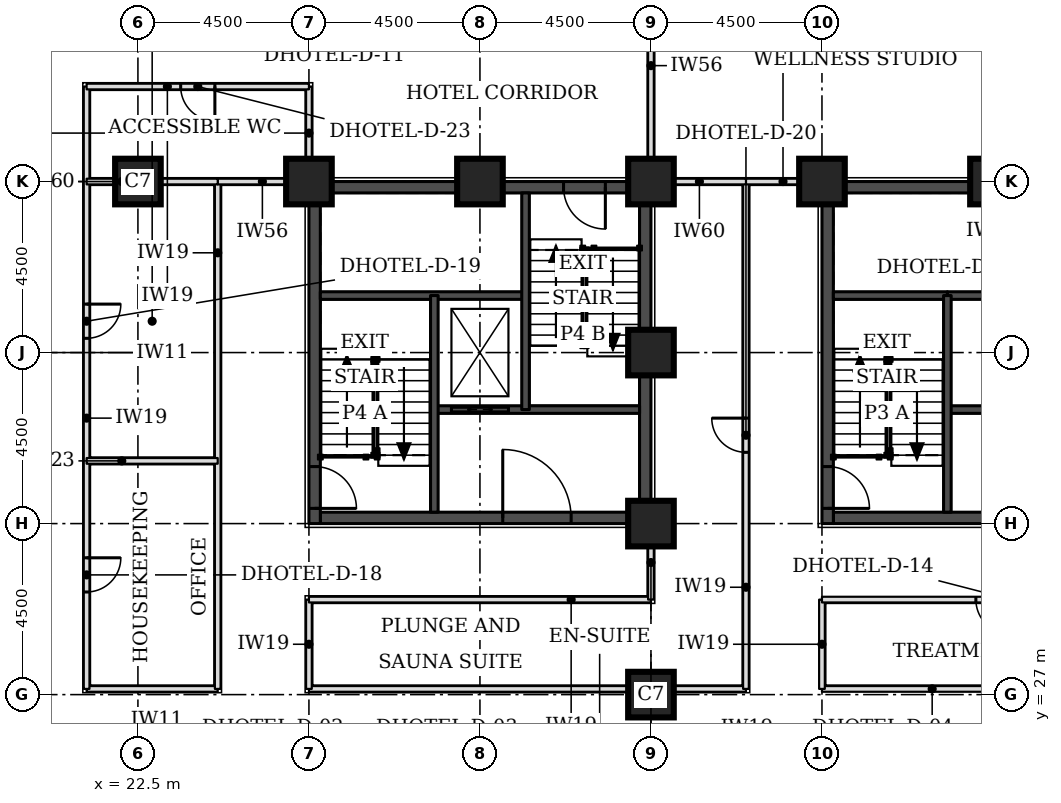
"""IFC4 building model, lengths in metres.
Left out: names, types, materials, properties, quantities, classifications, styles, units other than length and angle.
Written with IfcOpenShell. Run it as: python <this file> out.ifc"""

import sys

from ifc_helpers import new_model, si_unit, direction, frame, frame_2d, origin, origin_2d, place, context, subcontext, project, spatial, rectangle, extrude, element, fill, save


model = new_model("IFC4")
c1 = context("Model", 3, precision=1e-05, world=origin(), true_north=direction((0.0, 1.0)))
c2 = subcontext(c1, "Body", "Model", "MODEL_VIEW")
j1 = project(units=[si_unit("LENGTHUNIT", "METRE"), si_unit("PLANEANGLEUNIT", "RADIAN")], contexts=[c1])
p1 = place(None, origin())
s1 = spatial("IfcSite", under=j1, at=p1, CompositionType="ELEMENT")
p2 = place(p1, origin())
s2 = spatial("IfcBuilding", under=s1, at=p2, CompositionType="ELEMENT")
p3 = place(p2, frame((0.0, 0.0, 36.3)))
s3 = spatial("IfcBuildingStorey", under=s2, at=p3, CompositionType="ELEMENT", Elevation=36.3)
for number, where, z_axis, x_axis in (
    (1, (36.0, 27.0, 0.0), (0.0, 0.0, 1.0), (1.0, 0.0, 0.0)),
    (2, (36.0, 31.5, 0.0), (0.0, 0.0, 1.0), (1.0, 0.0, 0.0)),
    (3, (36.0, 36.0, 0.0), (0.0, 0.0, 1.0), (1.0, 0.0, 0.0)),
    (4, (22.5, 40.5, 0.0), (0.0, 0.0, 1.0), (1.0, 0.0, 0.0)),
    (5, (27.0, 40.5, 0.0), (0.0, 0.0, 1.0), (1.0, 0.0, 0.0)),
    (6, (31.5, 40.5, 0.0), (0.0, 0.0, 1.0), (1.0, 0.0, 0.0)),
    (7, (36.0, 40.5, 0.0), (0.0, 0.0, 1.0), (1.0, 0.0, 0.0)),
    (8, (40.5, 40.5, 0.0), (0.0, 0.0, 1.0), (1.0, 0.0, 0.0)),
    (9, (45.0, 40.5, 0.0), (0.0, 0.0, 1.0), (1.0, 0.0, 0.0)),
):
    element("IfcColumn", number, at=place(p3, frame(where, z_axis=z_axis, x_axis=x_axis)), inside=s3, PredefinedType="COLUMN", context=c2, shape_type="SweptSolid", body=[
        extrude(rectangle(XDim=1.2, YDim=1.2, at=origin_2d()), origin(), (0.0, 0.0, 1.0), 3.3),
    ])
p4 = place(p3, frame((40.8, 31.65, 0.0), z_axis=(0.0, 0.0, 1.0), x_axis=(1.0, 0.0, 0.0)))
e10 = element("IfcWall", 10, at=p4, inside=s3, PredefinedType="SHEAR", context=c2, shape_type="SweptSolid", body=[
    extrude(rectangle(XDim=8.4, YDim=0.3, at=frame_2d((4.2, 0.0))), origin(), (0.0, 0.0, 1.0), 3.3),
])
p5 = place(p4, frame((5.2, 0.0, 0.0)))
e11 = element("IfcOpeningElement", 11, at=p5, cuts=e10, PredefinedType="OPENING", context=c2, shape_type="SweptSolid", body=[
    extrude(rectangle(XDim=1.0, YDim=2.1, at=frame_2d((0.5, 1.05))), frame((0.0, 0.16, 0.0), z_axis=(0.0, -1.0, 0.0), x_axis=(1.0, 0.0, 0.0)), (0.0, 0.0, 1.0), 0.32),
])
p6 = place(p3, frame((40.8, 40.35, 0.0), z_axis=(0.0, 0.0, 1.0), x_axis=(1.0, 0.0, 0.0)))
e12 = element("IfcWall", 12, at=p6, inside=s3, PredefinedType="SHEAR", context=c2, shape_type="SweptSolid", body=[
    extrude(rectangle(XDim=8.4, YDim=0.3, at=frame_2d((4.2, 0.0))), origin(), (0.0, 0.0, 1.0), 3.3),
])
p7 = place(p6, frame((6.4, 0.0, 0.0)))
e13 = element("IfcOpeningElement", 13, at=p7, cuts=e12, PredefinedType="OPENING", context=c2, shape_type="SweptSolid", body=[
    extrude(rectangle(XDim=1.1, YDim=2.1, at=frame_2d((0.55, 1.05))), frame((0.0, 0.16, 0.0), z_axis=(0.0, -1.0, 0.0), x_axis=(1.0, 0.0, 0.0)), (0.0, 0.0, 1.0), 0.32),
])
p8 = place(p3, frame((40.65, 31.5, 0.0), z_axis=(0.0, 0.0, 1.0), x_axis=(0.0, 1.0, 0.0)))
e14 = element("IfcWall", 14, at=p8, inside=s3, PredefinedType="SHEAR", context=c2, shape_type="SweptSolid", body=[
    extrude(rectangle(XDim=9.0, YDim=0.3, at=frame_2d((4.5, 0.0))), origin(), (0.0, 0.0, 1.0), 3.3),
])
p9 = place(p8, frame((0.4, 0.0, 0.0)))
e15 = element("IfcOpeningElement", 15, at=p9, cuts=e14, PredefinedType="OPENING", context=c2, shape_type="SweptSolid", body=[
    extrude(rectangle(XDim=1.1, YDim=2.1, at=frame_2d((0.55, 1.05))), frame((0.0, 0.16, 0.0), z_axis=(0.0, -1.0, 0.0), x_axis=(1.0, 0.0, 0.0)), (0.0, 0.0, 1.0), 0.32),
])
p10 = place(p3, frame((27.3, 31.65, 0.0), z_axis=(0.0, 0.0, 1.0), x_axis=(1.0, 0.0, 0.0)))
e16 = element("IfcWall", 16, at=p10, inside=s3, PredefinedType="SHEAR", context=c2, shape_type="SweptSolid", body=[
    extrude(rectangle(XDim=8.4, YDim=0.3, at=frame_2d((4.2, 0.0))), origin(), (0.0, 0.0, 1.0), 3.3),
])
p11 = place(p10, frame((4.8, 0.0, 0.0)))
e17 = element("IfcOpeningElement", 17, at=p11, cuts=e16, PredefinedType="OPENING", context=c2, shape_type="SweptSolid", body=[
    extrude(rectangle(XDim=1.8, YDim=2.1, at=frame_2d((0.9, 1.05))), frame((0.0, 0.16, 0.0), z_axis=(0.0, -1.0, 0.0), x_axis=(1.0, 0.0, 0.0)), (0.0, 0.0, 1.0), 0.32),
])
p12 = place(p3, frame((27.3, 40.35, 0.0), z_axis=(0.0, 0.0, 1.0), x_axis=(1.0, 0.0, 0.0)))
e18 = element("IfcWall", 18, at=p12, inside=s3, PredefinedType="SHEAR", context=c2, shape_type="SweptSolid", body=[
    extrude(rectangle(XDim=8.4, YDim=0.3, at=frame_2d((4.2, 0.0))), origin(), (0.0, 0.0, 1.0), 3.3),
])
p13 = place(p12, frame((6.4, 0.0, 0.0)))
e19 = element("IfcOpeningElement", 19, at=p13, cuts=e18, PredefinedType="OPENING", context=c2, shape_type="SweptSolid", body=[
    extrude(rectangle(XDim=1.1, YDim=2.1, at=frame_2d((0.55, 1.05))), frame((0.0, 0.16, 0.0), z_axis=(0.0, -1.0, 0.0), x_axis=(1.0, 0.0, 0.0)), (0.0, 0.0, 1.0), 0.32),
])
p14 = place(p3, frame((27.15, 31.5, 0.0), z_axis=(0.0, 0.0, 1.0), x_axis=(0.0, 1.0, 0.0)))
e20 = element("IfcWall", 20, at=p14, inside=s3, PredefinedType="SHEAR", context=c2, shape_type="SweptSolid", body=[
    extrude(rectangle(XDim=9.0, YDim=0.3, at=frame_2d((4.5, 0.0))), origin(), (0.0, 0.0, 1.0), 3.3),
])
p15 = place(p14, frame((0.4, 0.0, 0.0)))
e21 = element("IfcOpeningElement", 21, at=p15, cuts=e20, PredefinedType="OPENING", context=c2, shape_type="SweptSolid", body=[
    extrude(rectangle(XDim=1.1, YDim=2.1, at=frame_2d((0.55, 1.05))), frame((0.0, 0.16, 0.0), z_axis=(0.0, -1.0, 0.0), x_axis=(1.0, 0.0, 0.0)), (0.0, 0.0, 1.0), 0.32),
])
p16 = place(p3, frame((35.85, 31.5, 0.0), z_axis=(0.0, 0.0, 1.0), x_axis=(0.0, 1.0, 0.0)))
e22 = element("IfcWall", 22, at=p16, inside=s3, PredefinedType="SHEAR", context=c2, shape_type="SweptSolid", body=[
    extrude(rectangle(XDim=9.0, YDim=0.3, at=frame_2d((4.5, 0.0))), origin(), (0.0, 0.0, 1.0), 3.3),
])
p17 = place(p3, frame((21.15, 27.15, 0.0), z_axis=(0.0, 0.0, 1.0), x_axis=(1.0, 0.0, 0.0)))
e23 = element("IfcWall", 23, at=p17, inside=s3, PredefinedType="PARTITIONING", context=c2, shape_type="SweptSolid", body=[
    extrude(rectangle(XDim=3.45, YDim=0.15, at=frame_2d((1.725, 0.0))), origin(), (0.0, 0.0, 1.0), 3.08),
])
p18 = place(p3, frame((21.15, 27.15, 0.0), z_axis=(0.0, 0.0, 1.0), x_axis=(0.0, 1.0, 0.0)))
e24 = element("IfcWall", 24, at=p18, inside=s3, PredefinedType="PARTITIONING", context=c2, shape_type="SweptSolid", body=[
    extrude(rectangle(XDim=15.85, YDim=0.15, at=frame_2d((7.925, 0.0))), origin(), (0.0, 0.0, 1.0), 3.08),
])
p19 = place(p18, frame((2.55, 0.0, 0.0)))
e25 = element("IfcOpeningElement", 25, at=p19, cuts=e24, PredefinedType="OPENING", context=c2, shape_type="SweptSolid", body=[
    extrude(rectangle(XDim=0.9, YDim=2.1, at=frame_2d((0.45, 1.05))), frame((0.0, 0.085, 0.0), z_axis=(0.0, -1.0, 0.0), x_axis=(1.0, 0.0, 0.0)), (0.0, 0.0, 1.0), 0.17),
])
p20 = place(p18, frame((9.225, 0.0, 0.0)))
e26 = element("IfcOpeningElement", 26, at=p20, cuts=e24, PredefinedType="OPENING", context=c2, shape_type="SweptSolid", body=[
    extrude(rectangle(XDim=0.9, YDim=2.1, at=frame_2d((0.45, 1.05))), frame((0.0, 0.085, 0.0), z_axis=(0.0, -1.0, 0.0), x_axis=(1.0, 0.0, 0.0)), (0.0, 0.0, 1.0), 0.17),
])
p21 = place(p3, frame((24.6, 27.15, 0.0), z_axis=(0.0, 0.0, 1.0), x_axis=(0.0, 1.0, 0.0)))
e27 = element("IfcWall", 27, at=p21, inside=s3, PredefinedType="PARTITIONING", context=c2, shape_type="SweptSolid", body=[
    extrude(rectangle(XDim=13.35, YDim=0.15, at=frame_2d((6.675, 0.0))), origin(), (0.0, 0.0, 1.0), 3.08),
])
p22 = place(p3, frame((27.0, 27.15, 0.0), z_axis=(0.0, 0.0, 1.0), x_axis=(1.0, 0.0, 0.0)))
e28 = element("IfcWall", 28, at=p22, inside=s3, PredefinedType="PARTITIONING", context=c2, shape_type="SweptSolid", body=[
    extrude(rectangle(XDim=11.5, YDim=0.15, at=frame_2d((5.75, 0.0))), origin(), (0.0, 0.0, 1.0), 3.08),
])
p23 = place(p3, frame((27.0, 27.15, 0.0), z_axis=(0.0, 0.0, 1.0), x_axis=(0.0, 1.0, 0.0)))
e29 = element("IfcWall", 29, at=p23, inside=s3, PredefinedType="PARTITIONING", context=c2, shape_type="SweptSolid", body=[
    extrude(rectangle(XDim=2.35, YDim=0.15, at=frame_2d((1.175, 0.0))), origin(), (0.0, 0.0, 1.0), 3.08),
])
p24 = place(p3, frame((38.5, 27.15, 0.0), z_axis=(0.0, 0.0, 1.0), x_axis=(0.0, 1.0, 0.0)))
e30 = element("IfcWall", 30, at=p24, inside=s3, PredefinedType="PARTITIONING", context=c2, shape_type="SweptSolid", body=[
    extrude(rectangle(XDim=13.35, YDim=0.15, at=frame_2d((6.675, 0.0))), origin(), (0.0, 0.0, 1.0), 3.08),
])
p25 = place(p24, frame((6.225, 0.0, 0.0)))
e31 = element("IfcOpeningElement", 31, at=p25, cuts=e30, PredefinedType="OPENING", context=c2, shape_type="SweptSolid", body=[
    extrude(rectangle(XDim=0.9, YDim=2.1, at=frame_2d((0.45, 1.05))), frame((0.0, 0.085, 0.0), z_axis=(0.0, -1.0, 0.0), x_axis=(1.0, 0.0, 0.0)), (0.0, 0.0, 1.0), 0.17),
])
p26 = place(p3, frame((40.5, 27.15, 0.0), z_axis=(0.0, 0.0, 1.0), x_axis=(1.0, 0.0, 0.0)))
e32 = element("IfcWall", 32, at=p26, inside=s3, PredefinedType="PARTITIONING", context=c2, shape_type="SweptSolid", body=[
    extrude(rectangle(XDim=9.0, YDim=0.15, at=frame_2d((4.5, 0.0))), origin(), (0.0, 0.0, 1.0), 3.08),
])
p27 = place(p3, frame((40.5, 27.15, 0.0), z_axis=(0.0, 0.0, 1.0), x_axis=(0.0, 1.0, 0.0)))
e33 = element("IfcWall", 33, at=p27, inside=s3, PredefinedType="PARTITIONING", context=c2, shape_type="SweptSolid", body=[
    extrude(rectangle(XDim=2.35, YDim=0.15, at=frame_2d((1.175, 0.0))), origin(), (0.0, 0.0, 1.0), 3.08),
])
p28 = place(p3, frame((27.0, 29.5, 0.0), z_axis=(0.0, 0.0, 1.0), x_axis=(1.0, 0.0, 0.0)))
e34 = element("IfcWall", 34, at=p28, inside=s3, PredefinedType="PARTITIONING", context=c2, shape_type="SweptSolid", body=[
    extrude(rectangle(XDim=9.0, YDim=0.15, at=frame_2d((4.5, 0.0))), origin(), (0.0, 0.0, 1.0), 3.08),
])
p29 = place(p3, frame((36.0, 29.5, 0.0), z_axis=(0.0, 0.0, 1.0), x_axis=(0.0, 1.0, 0.0)))
e35 = element("IfcWall", 35, at=p29, inside=s3, PredefinedType="PARTITIONING", context=c2, shape_type="SweptSolid", body=[
    extrude(rectangle(XDim=1.95, YDim=0.15, at=frame_2d((0.975, 0.0))), origin(), (0.0, 0.0, 1.0), 2.33),
])
p30 = place(p3, frame((40.5, 29.5, 0.0), z_axis=(0.0, 0.0, 1.0), x_axis=(1.0, 0.0, 0.0)))
e36 = element("IfcWall", 36, at=p30, inside=s3, PredefinedType="PARTITIONING", context=c2, shape_type="SweptSolid", body=[
    extrude(rectangle(XDim=9.0, YDim=0.15, at=frame_2d((4.5, 0.0))), origin(), (0.0, 0.0, 1.0), 3.08),
])
p31 = place(p30, frame((4.05, 0.0, 0.0)))
e37 = element("IfcOpeningElement", 37, at=p31, cuts=e36, PredefinedType="OPENING", context=c2, shape_type="SweptSolid", body=[
    extrude(rectangle(XDim=0.9, YDim=2.1, at=frame_2d((0.45, 1.05))), frame((0.0, 0.085, 0.0), z_axis=(0.0, -1.0, 0.0), x_axis=(1.0, 0.0, 0.0)), (0.0, 0.0, 1.0), 0.17),
])
p32 = place(p3, frame((24.6, 40.5, 0.0), z_axis=(0.0, 0.0, 1.0), x_axis=(1.0, 0.0, 0.0)))
e38 = element("IfcWall", 38, at=p32, inside=s3, PredefinedType="PARTITIONING", context=c2, shape_type="SweptSolid", body=[
    extrude(rectangle(XDim=2.35, YDim=0.15, at=frame_2d((1.175, 0.0))), origin(), (0.0, 0.0, 1.0), 2.33),
])
p33 = place(p3, frame((38.5, 40.5, 0.0), z_axis=(0.0, 0.0, 1.0), x_axis=(1.0, 0.0, 0.0)))
e39 = element("IfcWall", 39, at=p33, inside=s3, PredefinedType="PARTITIONING", context=c2, shape_type="SweptSolid", body=[
    extrude(rectangle(XDim=1.95, YDim=0.15, at=frame_2d((0.975, 0.0))), origin(), (0.0, 0.0, 1.0), 2.33),
])
p34 = place(p3, frame((27.0, 40.55, 0.0), z_axis=(0.0, 0.0, 1.0), x_axis=(0.0, 1.0, 0.0)))
e40 = element("IfcWall", 40, at=p34, inside=s3, PredefinedType="PARTITIONING", context=c2, shape_type="SweptSolid", body=[
    extrude(rectangle(XDim=2.45, YDim=0.15, at=frame_2d((1.225, 0.0))), origin(), (0.0, 0.0, 1.0), 3.08),
])
p35 = place(p3, frame((36.0, 40.55, 0.0), z_axis=(0.0, 0.0, 1.0), x_axis=(0.0, 1.0, 0.0)))
e41 = element("IfcWall", 41, at=p35, inside=s3, PredefinedType="PARTITIONING", context=c2, shape_type="SweptSolid", body=[
    extrude(rectangle(XDim=4.4, YDim=0.15, at=frame_2d((2.2, 0.0))), origin(), (0.0, 0.0, 1.0), 2.33),
])
p36 = place(p3, frame((21.15, 43.0, 0.0), z_axis=(0.0, 0.0, 1.0), x_axis=(1.0, 0.0, 0.0)))
e42 = element("IfcWall", 42, at=p36, inside=s3, PredefinedType="PARTITIONING", context=c2, shape_type="SweptSolid", body=[
    extrude(rectangle(XDim=5.85, YDim=0.15, at=frame_2d((2.925, 0.0))), origin(), (0.0, 0.0, 1.0), 3.08),
])
p37 = place(p36, frame((2.475, 0.0, 0.0)))
e43 = element("IfcOpeningElement", 43, at=p37, cuts=e42, PredefinedType="OPENING", context=c2, shape_type="SweptSolid", body=[
    extrude(rectangle(XDim=0.9, YDim=2.1, at=frame_2d((0.45, 1.05))), frame((0.0, 0.085, 0.0), z_axis=(0.0, -1.0, 0.0), x_axis=(1.0, 0.0, 0.0)), (0.0, 0.0, 1.0), 0.17),
])
p38 = place(p3, frame((21.15, 33.15, 0.0), z_axis=(0.0, 0.0, 1.0), x_axis=(1.0, 0.0, 0.0)))
e44 = element("IfcWall", 44, at=p38, inside=s3, PredefinedType="PARTITIONING", context=c2, shape_type="SweptSolid", body=[
    extrude(rectangle(XDim=3.45, YDim=0.15, at=frame_2d((1.725, 0.0))), origin(), (0.0, 0.0, 1.0), 3.08),
])
p39 = place(p3, frame((21.15, 40.5, 0.0), z_axis=(0.0, 0.0, 1.0), x_axis=(1.0, 0.0, 0.0)))
e45 = element("IfcWall", 45, at=p39, inside=s3, PredefinedType="PARTITIONING", context=c2, shape_type="SweptSolid", body=[
    extrude(rectangle(XDim=3.45, YDim=0.15, at=frame_2d((1.725, 0.0))), origin(), (0.0, 0.0, 1.0), 2.33),
])
p40 = place(p3, frame((36.05, 40.5, 0.0), z_axis=(0.0, 0.0, 1.0), x_axis=(1.0, 0.0, 0.0)))
e46 = element("IfcWall", 46, at=p40, inside=s3, PredefinedType="PARTITIONING", context=c2, shape_type="SweptSolid", body=[
    extrude(rectangle(XDim=2.45, YDim=0.15, at=frame_2d((1.225, 0.0))), origin(), (0.0, 0.0, 1.0), 2.33),
])
p41 = place(p3, frame((43.8, 34.5, 0.0), z_axis=(0.0, 0.0, 1.0), x_axis=(1.0, 0.0, 0.0)))
e47 = element("IfcWall", 47, at=p41, inside=s3, PredefinedType="SOLIDWALL", context=c2, shape_type="SweptSolid", body=[
    extrude(rectangle(XDim=2.4, YDim=0.2, at=frame_2d((1.2, 0.0))), origin(), (0.0, 0.0, 1.0), 3.08),
])
p42 = place(p3, frame((43.8, 37.5, 0.0), z_axis=(0.0, 0.0, 1.0), x_axis=(1.0, 0.0, 0.0)))
e48 = element("IfcWall", 48, at=p42, inside=s3, PredefinedType="SOLIDWALL", context=c2, shape_type="SweptSolid", body=[
    extrude(rectangle(XDim=2.4, YDim=0.2, at=frame_2d((1.2, 0.0))), origin(), (0.0, 0.0, 1.0), 3.3),
])
p43 = place(p3, frame((40.8, 37.5, 0.0), z_axis=(0.0, 0.0, 1.0), x_axis=(1.0, 0.0, 0.0)))
e49 = element("IfcWall", 49, at=p43, inside=s3, PredefinedType="SOLIDWALL", context=c2, shape_type="SweptSolid", body=[
    extrude(rectangle(XDim=3.0, YDim=0.2, at=frame_2d((1.5, 0.0))), origin(), (0.0, 0.0, 1.0), 3.08),
])
p44 = place(p3, frame((43.8, 31.8, 0.0), z_axis=(0.0, 0.0, 1.0), x_axis=(0.0, 1.0, 0.0)))
e50 = element("IfcWall", 50, at=p44, inside=s3, PredefinedType="SOLIDWALL", context=c2, shape_type="SweptSolid", body=[
    extrude(rectangle(XDim=5.7, YDim=0.2, at=frame_2d((2.85, 0.0))), origin(), (0.0, 0.0, 1.0), 3.08),
])
p45 = place(p3, frame((30.3, 34.5, 0.0), z_axis=(0.0, 0.0, 1.0), x_axis=(1.0, 0.0, 0.0)))
e51 = element("IfcWall", 51, at=p45, inside=s3, PredefinedType="SOLIDWALL", context=c2, shape_type="SweptSolid", body=[
    extrude(rectangle(XDim=5.4, YDim=0.2, at=frame_2d((2.7, 0.0))), origin(), (0.0, 0.0, 1.0), 3.08),
])
p46 = place(p45, frame((0.45, 0.0, 0.0)))
e52 = element("IfcOpeningElement", 52, at=p46, cuts=e51, PredefinedType="OPENING", context=c2, shape_type="SweptSolid", body=[
    extrude(rectangle(XDim=1.5, YDim=2.1, at=frame_2d((0.75, 1.05))), frame((0.0, 0.11, 0.0), z_axis=(0.0, -1.0, 0.0), x_axis=(1.0, 0.0, 0.0)), (0.0, 0.0, 1.0), 0.22),
])
p47 = place(p3, frame((27.3, 37.5, 0.0), z_axis=(0.0, 0.0, 1.0), x_axis=(1.0, 0.0, 0.0)))
e53 = element("IfcWall", 53, at=p47, inside=s3, PredefinedType="SOLIDWALL", context=c2, shape_type="SweptSolid", body=[
    extrude(rectangle(XDim=5.4, YDim=0.2, at=frame_2d((2.7, 0.0))), origin(), (0.0, 0.0, 1.0), 3.08),
])
for number, where, z_axis, x_axis in (
    (54, (30.3, 31.8, 0.0), (0.0, 0.0, 1.0), (0.0, 1.0, 0.0)),
    (55, (32.7, 34.5, 0.0), (0.0, 0.0, 1.0), (0.0, 1.0, 0.0)),
):
    element("IfcWall", number, at=place(p3, frame(where, z_axis=z_axis, x_axis=x_axis)), inside=s3, PredefinedType="SOLIDWALL", context=c2, shape_type="SweptSolid", body=[
        extrude(rectangle(XDim=5.7, YDim=0.2, at=frame_2d((2.85, 0.0))), origin(), (0.0, 0.0, 1.0), 3.08),
    ])
p48 = place(p19, frame((0.9, 0.0, 0.0), z_axis=(0.0, 0.0, 1.0), x_axis=(-1.0, 0.0, 0.0)))
e56 = element("IfcDoor", 56, at=p48, inside=s3, OperationType="SINGLE_SWING_LEFT", PredefinedType="DOOR", context=c2, shape_type="SweptSolid", body=[
    extrude(rectangle(XDim=0.9, YDim=2.1, at=frame_2d((0.45, 1.05))), frame((0.0, 0.025, 0.0), z_axis=(0.0, -1.0, 0.0), x_axis=(1.0, 0.0, 0.0)), (0.0, 0.0, 1.0), 0.05),
])
fill(e25, e56)
p49 = place(p20, frame((0.9, 0.0, 0.0), z_axis=(0.0, 0.0, 1.0), x_axis=(-1.0, 0.0, 0.0)))
e57 = element("IfcDoor", 57, at=p49, inside=s3, OperationType="SINGLE_SWING_LEFT", PredefinedType="DOOR", context=c2, shape_type="SweptSolid", body=[
    extrude(rectangle(XDim=0.9, YDim=2.1, at=frame_2d((0.45, 1.05))), frame((0.0, 0.025, 0.0), z_axis=(0.0, -1.0, 0.0), x_axis=(1.0, 0.0, 0.0)), (0.0, 0.0, 1.0), 0.05),
])
fill(e26, e57)
p50 = place(p25, origin())
e58 = element("IfcDoor", 58, at=p50, inside=s3, OperationType="SINGLE_SWING_RIGHT", PredefinedType="DOOR", context=c2, shape_type="SweptSolid", body=[
    extrude(rectangle(XDim=0.9, YDim=2.1, at=frame_2d((0.45, 1.05))), frame((0.0, 0.025, 0.0), z_axis=(0.0, -1.0, 0.0), x_axis=(1.0, 0.0, 0.0)), (0.0, 0.0, 1.0), 0.05),
])
fill(e31, e58)
p51 = place(p31, frame((0.9, 0.0, 0.0), z_axis=(0.0, 0.0, 1.0), x_axis=(-1.0, 0.0, 0.0)))
e59 = element("IfcDoor", 59, at=p51, inside=s3, OperationType="SINGLE_SWING_LEFT", PredefinedType="DOOR", context=c2, shape_type="SweptSolid", body=[
    extrude(rectangle(XDim=0.9, YDim=2.1, at=frame_2d((0.45, 1.05))), frame((0.0, 0.025, 0.0), z_axis=(0.0, -1.0, 0.0), x_axis=(1.0, 0.0, 0.0)), (0.0, 0.0, 1.0), 0.05),
])
fill(e37, e59)
p52 = place(p37, frame((0.9, 0.0, 0.0), z_axis=(0.0, 0.0, 1.0), x_axis=(-1.0, 0.0, 0.0)))
e60 = element("IfcDoor", 60, at=p52, inside=s3, OperationType="SINGLE_SWING_LEFT", PredefinedType="DOOR", context=c2, shape_type="SweptSolid", body=[
    extrude(rectangle(XDim=0.9, YDim=2.1, at=frame_2d((0.45, 1.05))), frame((0.0, 0.025, 0.0), z_axis=(0.0, -1.0, 0.0), x_axis=(1.0, 0.0, 0.0)), (0.0, 0.0, 1.0), 0.05),
])
fill(e43, e60)
p53 = place(p9, frame((1.1, 0.0, 0.0), z_axis=(0.0, 0.0, 1.0), x_axis=(-1.0, 0.0, 0.0)))
e61 = element("IfcDoor", 61, at=p53, inside=s3, OperationType="SINGLE_SWING_RIGHT", PredefinedType="DOOR", context=c2, shape_type="SweptSolid", body=[
    extrude(rectangle(XDim=1.1, YDim=2.1, at=frame_2d((0.55, 1.05))), frame((0.0, 0.025, 0.0), z_axis=(0.0, -1.0, 0.0), x_axis=(1.0, 0.0, 0.0)), (0.0, 0.0, 1.0), 0.05),
])
fill(e15, e61)
p54 = place(p15, frame((1.1, 0.0, 0.0), z_axis=(0.0, 0.0, 1.0), x_axis=(-1.0, 0.0, 0.0)))
e62 = element("IfcDoor", 62, at=p54, inside=s3, OperationType="SINGLE_SWING_RIGHT", PredefinedType="DOOR", context=c2, shape_type="SweptSolid", body=[
    extrude(rectangle(XDim=1.1, YDim=2.1, at=frame_2d((0.55, 1.05))), frame((0.0, 0.025, 0.0), z_axis=(0.0, -1.0, 0.0), x_axis=(1.0, 0.0, 0.0)), (0.0, 0.0, 1.0), 0.05),
])
fill(e21, e62)
p55 = place(p13, frame((1.1, 0.0, 0.0), z_axis=(0.0, 0.0, 1.0), x_axis=(-1.0, 0.0, 0.0)))
e63 = element("IfcDoor", 63, at=p55, inside=s3, OperationType="SINGLE_SWING_LEFT", PredefinedType="DOOR", context=c2, shape_type="SweptSolid", body=[
    extrude(rectangle(XDim=1.1, YDim=2.1, at=frame_2d((0.55, 1.05))), frame((0.0, 0.025, 0.0), z_axis=(0.0, -1.0, 0.0), x_axis=(1.0, 0.0, 0.0)), (0.0, 0.0, 1.0), 0.05),
])
fill(e19, e63)
p56 = place(p46, origin())
e64 = element("IfcDoor", 64, at=p56, inside=s3, OperationType="DOUBLE_DOOR_SLIDING", PredefinedType="DOOR", context=c2, shape_type="SweptSolid", body=[
    extrude(rectangle(XDim=1.5, YDim=2.1, at=frame_2d((0.75, 1.05))), frame((0.0, 0.025, 0.0), z_axis=(0.0, -1.0, 0.0), x_axis=(1.0, 0.0, 0.0)), (0.0, 0.0, 1.0), 0.05),
])
fill(e52, e64)
p57 = place(p11, origin())
e65 = element("IfcDoor", 65, at=p57, inside=s3, OperationType="SINGLE_SWING_LEFT", PredefinedType="DOOR", context=c2, shape_type="SweptSolid", body=[
    extrude(rectangle(XDim=1.8, YDim=2.1, at=frame_2d((0.9, 1.05))), frame((0.0, 0.025, 0.0), z_axis=(0.0, -1.0, 0.0), x_axis=(1.0, 0.0, 0.0)), (0.0, 0.0, 1.0), 0.05),
])
fill(e17, e65)
save(model, sys.argv[1])
